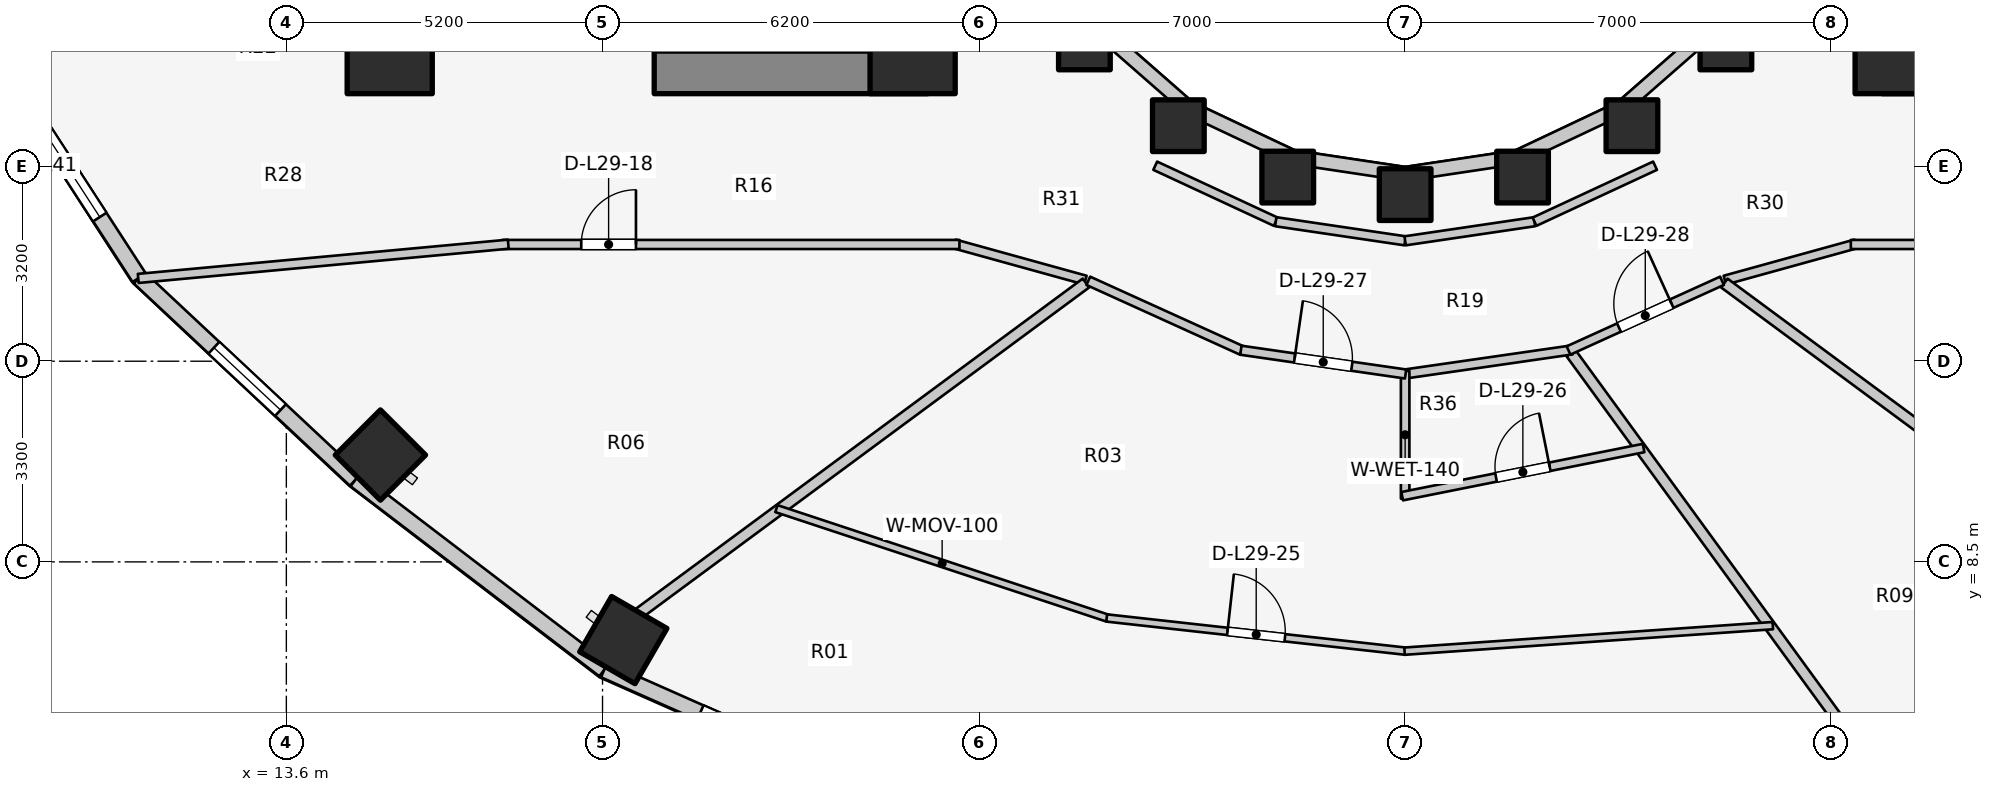
"""IFC4 building model, lengths in metres.
Left out: names, types, materials, properties, quantities, classifications, styles, units other than length and angle.
Written with IfcOpenShell. Run it as: python <this file> out.ifc"""

import sys

from ifc_helpers import new_model, si_unit, direction, frame, frame_2d, origin, origin_2d, place, context, subcontext, project, spatial, rectangle, extrude, element, fill, save


model = new_model("IFC4")
c1 = context("Model", 3, precision=1e-05, world=origin(), true_north=direction((0.0, 1.0)))
c2 = subcontext(c1, "Body", "Model", "MODEL_VIEW")
j1 = project(units=[si_unit("LENGTHUNIT", "METRE"), si_unit("PLANEANGLEUNIT", "RADIAN")], contexts=[c1])
p1 = place(None, origin())
s1 = spatial("IfcSite", under=j1, at=p1, CompositionType="ELEMENT")
p2 = place(p1, origin())
s2 = spatial("IfcBuilding", under=s1, at=p2, CompositionType="ELEMENT")
p3 = place(p2, frame((0.0, 0.0, 98.0)))
s3 = spatial("IfcBuildingStorey", under=s2, at=p3, CompositionType="ELEMENT", Elevation=98.0)
for number, where, z_axis, x_axis in (
    (1, (19.65, 16.55, 0.0), (0.0, 0.0, 1.0), (1.0, 0.0, 0.0)),
    (2, (39.85, 16.55, 0.0), (0.0, 0.0, 1.0), (1.0, 0.0, 0.0)),
):
    element("IfcWall", number, at=place(p3, frame(where, z_axis=z_axis, x_axis=x_axis)), inside=s3, PredefinedType="SHEAR", context=c2, shape_type="SweptSolid", body=[
        extrude(rectangle(XDim=4.5, YDim=0.7, at=frame_2d((2.25, 0.0))), origin(), (0.0, 0.0, 1.0), 3.1),
    ])
for number, where, z_axis, x_axis in (
    (3, (15.3, 16.9, 0.0), (0.0, 0.0, 1.0), (1.0, 0.0, 0.0)),
    (4, (23.9, 16.9, 0.0), (0.0, 0.0, 1.0), (1.0, 0.0, 0.0)),
    (5, (40.1, 16.9, 0.0), (0.0, 0.0, 1.0), (1.0, 0.0, 0.0)),
):
    element("IfcColumn", number, at=place(p3, frame(where, z_axis=z_axis, x_axis=x_axis)), inside=s3, PredefinedType="COLUMN", context=c2, shape_type="SweptSolid", body=[
        extrude(rectangle(XDim=1.4, YDim=1.4, at=origin_2d()), origin(), (0.0, 0.0, 1.0), 3.1),
    ])
p4 = place(p3, frame((26.725, 17.018, 0.0), z_axis=(0.0, 0.0, 1.0), x_axis=(1.0, 0.0, 0.0)))
e6 = element("IfcColumn", 6, at=p4, inside=s3, PredefinedType="COLUMN", context=c2, shape_type="SweptSolid", body=[
    extrude(rectangle(XDim=0.85, YDim=0.85, at=origin_2d()), origin(), (0.0, 0.0, 1.0), 3.1),
])
p5 = place(p3, frame((15.147, 10.257, 0.0), z_axis=(0.0, 0.0, 1.0), x_axis=(-0.707106781187, -0.707106781187, 0.0)))
e7 = element("IfcColumn", 7, at=p5, inside=s3, PredefinedType="COLUMN", context=c2, shape_type="SweptSolid", body=[
    extrude(rectangle(XDim=1.05, YDim=1.05, at=origin_2d()), origin(), (0.0, 0.0, 1.0), 3.1),
])
p6 = place(p3, frame((28.27, 15.673, 0.0), z_axis=(0.0, 0.0, 1.0), x_axis=(1.0, 0.0, 0.0)))
e8 = element("IfcColumn", 8, at=p6, inside=s3, PredefinedType="COLUMN", context=c2, shape_type="SweptSolid", body=[
    extrude(rectangle(XDim=0.85, YDim=0.85, at=origin_2d()), origin(), (0.0, 0.0, 1.0), 3.1),
])
p7 = place(p3, frame((19.142, 7.214, 0.0), z_axis=(0.0, 0.0, 1.0), x_axis=(-0.5, -0.866025403784, 0.0)))
e9 = element("IfcColumn", 9, at=p7, inside=s3, PredefinedType="COLUMN", context=c2, shape_type="SweptSolid", body=[
    extrude(rectangle(XDim=1.05, YDim=1.05, at=origin_2d()), origin(), (0.0, 0.0, 1.0), 3.1),
])
for number, where, z_axis, x_axis in (
    (10, (30.069, 14.828, 0.0), (0.0, 0.0, 1.0), (1.0, 0.0, 0.0)),
    (11, (32.0, 14.54, 0.0), (0.0, 0.0, 1.0), (1.0, 0.0, 0.0)),
    (12, (33.931, 14.828, 0.0), (0.0, 0.0, 1.0), (1.0, 0.0, 0.0)),
    (13, (35.73, 15.673, 0.0), (0.0, 0.0, 1.0), (1.0, 0.0, 0.0)),
    (14, (37.275, 17.018, 0.0), (0.0, 0.0, 1.0), (1.0, 0.0, 0.0)),
):
    element("IfcColumn", number, at=place(p3, frame(where, z_axis=z_axis, x_axis=x_axis)), inside=s3, PredefinedType="COLUMN", context=c2, shape_type="SweptSolid", body=[
        extrude(rectangle(XDim=0.85, YDim=0.85, at=origin_2d()), origin(), (0.0, 0.0, 1.0), 3.1),
    ])
p8 = place(p3, frame((26.965, 17.258, 0.0), z_axis=(0.0, 0.0, 1.0), x_axis=(0.752576694707, -0.658504607869, 0.0)))
e15 = element("IfcWall", 15, at=p8, inside=s3, PredefinedType="STANDARD", context=c2, shape_type="SweptSolid", body=[
    extrude(rectangle(XDim=1.959, YDim=0.23, at=frame_2d((0.98, 0.0))), origin(), (0.0, 0.0, 1.0), 2.16),
])
p9 = place(p3, frame((28.44, 15.968, 0.0), z_axis=(0.0, 0.0, 1.0), x_axis=(0.904179699603, -0.427152280606, 0.0)))
e16 = element("IfcWall", 16, at=p9, inside=s3, PredefinedType="STANDARD", context=c2, shape_type="SweptSolid", body=[
    extrude(rectangle(XDim=1.899, YDim=0.23, at=frame_2d((0.95, 0.0))), origin(), (0.0, 0.0, 1.0), 2.16),
])
for number, where, z_axis, x_axis in (
    (17, (30.157, 15.157, 0.0), (0.0, 0.0, 1.0), (0.989, -0.149, 0.0)),
    (18, (32.0, 14.88, 0.0), (0.0, 0.0, 1.0), (0.989, 0.149, 0.0)),
):
    element("IfcWall", number, at=place(p3, frame(where, z_axis=z_axis, x_axis=x_axis)), inside=s3, PredefinedType="STANDARD", context=c2, shape_type="SweptSolid", body=[
        extrude(rectangle(XDim=1.864, YDim=0.23, at=frame_2d((0.932, 0.0))), origin(), (0.0, 0.0, 1.0), 2.16),
    ])
p10 = place(p3, frame((33.843, 15.157, 0.0), z_axis=(0.0, 0.0, 1.0), x_axis=(0.904179699603, 0.427152280606, 0.0)))
e19 = element("IfcWall", 19, at=p10, inside=s3, PredefinedType="STANDARD", context=c2, shape_type="SweptSolid", body=[
    extrude(rectangle(XDim=1.899, YDim=0.23, at=frame_2d((0.95, 0.0))), origin(), (0.0, 0.0, 1.0), 2.16),
])
p11 = place(p3, frame((35.56, 15.968, 0.0), z_axis=(0.0, 0.0, 1.0), x_axis=(0.752576694707, 0.658504607869, 0.0)))
e20 = element("IfcWall", 20, at=p11, inside=s3, PredefinedType="STANDARD", context=c2, shape_type="SweptSolid", body=[
    extrude(rectangle(XDim=1.959, YDim=0.23, at=frame_2d((0.98, 0.0))), origin(), (0.0, 0.0, 1.0), 2.16),
])
p12 = place(p3, frame((8.578, 17.181, 0.0), z_axis=(0.0, 0.0, 1.0), x_axis=(0.544388392991, -0.838833283541, 0.0)))
e21 = element("IfcWall", 21, at=p12, inside=s3, PredefinedType="STANDARD", context=c2, shape_type="SweptSolid", body=[
    extrude(rectangle(XDim=4.778, YDim=0.26, at=frame_2d((2.389, 0.0))), origin(), (0.0, 0.0, 1.0), 2.85),
])
p13 = place(p12, frame((1.189, 0.0, 0.75)))
e22 = element("IfcOpeningElement", 22, at=p13, cuts=e21, PredefinedType="OPENING", context=c2, shape_type="SweptSolid", body=[
    extrude(rectangle(XDim=2.4, YDim=1.7, at=frame_2d((1.2, 0.85))), frame((0.0, 0.14, 0.0), z_axis=(0.0, -1.0, 0.0), x_axis=(1.0, 0.0, 0.0)), (0.0, 0.0, 1.0), 0.28),
])
p14 = place(p3, frame((11.179, 13.173, 0.0), z_axis=(0.0, 0.0, 1.0), x_axis=(0.730162452258, -0.68327358599, 0.0)))
e23 = element("IfcWall", 23, at=p14, inside=s3, PredefinedType="STANDARD", context=c2, shape_type="SweptSolid", body=[
    extrude(rectangle(XDim=4.868, YDim=0.26, at=frame_2d((2.434, 0.0))), origin(), (0.0, 0.0, 1.0), 2.85),
])
p15 = place(p14, frame((1.684, 0.0, 0.75)))
e24 = element("IfcOpeningElement", 24, at=p15, cuts=e23, PredefinedType="OPENING", context=c2, shape_type="SweptSolid", body=[
    extrude(rectangle(XDim=1.5, YDim=1.6, at=frame_2d((0.75, 0.8))), frame((0.0, 0.14, 0.0), z_axis=(0.0, -1.0, 0.0), x_axis=(1.0, 0.0, 0.0)), (0.0, 0.0, 1.0), 0.28),
])
p16 = place(p3, frame((14.734, 9.847, 0.0), z_axis=(0.0, 0.0, 1.0), x_axis=(0.794809810864, -0.606858603427, 0.0)))
e25 = element("IfcWall", 25, at=p16, inside=s3, PredefinedType="STANDARD", context=c2, shape_type="SweptSolid", body=[
    extrude(rectangle(XDim=5.149, YDim=0.26, at=frame_2d((2.575, 0.0))), origin(), (0.0, 0.0, 1.0), 2.85),
])
p17 = place(p3, frame((18.827, 6.722, 0.0), z_axis=(0.0, 0.0, 1.0), x_axis=(0.914336605747, -0.404955023911, 0.0)))
e26 = element("IfcWall", 26, at=p17, inside=s3, PredefinedType="STANDARD", context=c2, shape_type="SweptSolid", body=[
    extrude(rectangle(XDim=5.859, YDim=0.26, at=frame_2d((2.929, 0.0))), origin(), (0.0, 0.0, 1.0), 2.85),
])
p18 = place(p17, frame((1.729, 0.0, 0.75)))
e27 = element("IfcOpeningElement", 27, at=p18, cuts=e26, PredefinedType="OPENING", context=c2, shape_type="SweptSolid", body=[
    extrude(rectangle(XDim=2.4, YDim=1.7, at=frame_2d((1.2, 0.85))), frame((0.0, 0.14, 0.0), z_axis=(0.0, -1.0, 0.0), x_axis=(1.0, 0.0, 0.0)), (0.0, 0.0, 1.0), 0.28),
])
p19 = place(p3, frame((39.816, 4.349, 0.0), z_axis=(0.0, 0.0, 1.0), x_axis=(0.914336605747, 0.404955023911, 0.0)))
e28 = element("IfcWall", 28, at=p19, inside=s3, PredefinedType="STANDARD", context=c2, shape_type="SweptSolid", body=[
    extrude(rectangle(XDim=5.859, YDim=0.26, at=frame_2d((2.929, 0.0))), origin(), (0.0, 0.0, 1.0), 2.85),
])
p20 = place(p19, frame((1.729, 0.0, 0.75)))
e29 = element("IfcOpeningElement", 29, at=p20, cuts=e28, PredefinedType="OPENING", context=c2, shape_type="SweptSolid", body=[
    extrude(rectangle(XDim=2.4, YDim=1.7, at=frame_2d((1.2, 0.85))), frame((0.0, 0.14, 0.0), z_axis=(0.0, -1.0, 0.0), x_axis=(1.0, 0.0, 0.0)), (0.0, 0.0, 1.0), 0.28),
])
p21 = place(p3, frame((27.89, 15.015, 0.0), z_axis=(0.0, 0.0, 1.0), x_axis=(0.906943449489, -0.421252393975, 0.0)))
e30 = element("IfcWall", 30, at=p21, inside=s3, PredefinedType="PARTITIONING", context=c2, shape_type="SweptSolid", body=[
    extrude(rectangle(XDim=2.186, YDim=0.15, at=frame_2d((1.093, 0.0))), origin(), (0.0, 0.0, 1.0), 2.272),
])
for number, where, z_axis, x_axis in (
    (31, (29.873, 14.094, 0.0), (0.0, 0.0, 1.0), (0.989, -0.146, 0.0)),
    (32, (32.0, 13.78, 0.0), (0.0, 0.0, 1.0), (0.989, 0.146, 0.0)),
):
    element("IfcWall", number, at=place(p3, frame(where, z_axis=z_axis, x_axis=x_axis)), inside=s3, PredefinedType="PARTITIONING", context=c2, shape_type="SweptSolid", body=[
        extrude(rectangle(XDim=2.151, YDim=0.15, at=frame_2d((1.075, 0.0))), origin(), (0.0, 0.0, 1.0), 2.272),
    ])
p22 = place(p3, frame((34.127, 14.094, 0.0), z_axis=(0.0, 0.0, 1.0), x_axis=(0.906943449489, 0.421252393975, 0.0)))
e33 = element("IfcWall", 33, at=p22, inside=s3, PredefinedType="PARTITIONING", context=c2, shape_type="SweptSolid", body=[
    extrude(rectangle(XDim=2.186, YDim=0.15, at=frame_2d((1.093, 0.0))), origin(), (0.0, 0.0, 1.0), 2.272),
])
p23 = place(p3, frame((26.742, 13.133, 0.0), z_axis=(0.0, 0.0, 1.0), x_axis=(-0.963833843713, 0.266503886865, 0.0)))
e34 = element("IfcWall", 34, at=p23, inside=s3, PredefinedType="PARTITIONING", context=c2, shape_type="SweptSolid", body=[
    extrude(rectangle(XDim=2.232, YDim=0.15, at=frame_2d((1.116, 0.0))), origin(), (0.0, 0.0, 1.0), 2.272),
])
p24 = place(p3, frame((17.15, 13.72, 0.0), z_axis=(0.0, 0.0, 1.0), x_axis=(1.0, 0.0, 0.0)))
e35 = element("IfcWall", 35, at=p24, inside=s3, PredefinedType="PARTITIONING", context=c2, shape_type="SweptSolid", body=[
    extrude(rectangle(XDim=7.52, YDim=0.15, at=frame_2d((3.76, 0.0))), origin(), (0.0, 0.0, 1.0), 2.272),
])
p25 = place(p24, frame((1.3, 0.0, 0.0)))
e36 = element("IfcOpeningElement", 36, at=p25, cuts=e35, PredefinedType="OPENING", context=c2, shape_type="SweptSolid", body=[
    extrude(rectangle(XDim=0.9, YDim=2.1, at=frame_2d((0.45, 1.05))), frame((0.0, 0.085, 0.0), z_axis=(0.0, -1.0, 0.0), x_axis=(1.0, 0.0, 0.0)), (0.0, 0.0, 1.0), 0.17),
])
p26 = place(p3, frame((17.25, 13.725, 0.0), z_axis=(0.0, 0.0, 1.0), x_axis=(-0.995748209098, -0.092116795851, 0.0)))
e37 = element("IfcWall", 37, at=p26, inside=s3, PredefinedType="PARTITIONING", context=c2, shape_type="SweptSolid", body=[
    extrude(rectangle(XDim=6.112, YDim=0.15, at=frame_2d((3.056, 0.0))), origin(), (0.0, 0.0, 1.0), 2.142),
])
p27 = place(p3, frame((37.258, 13.133, 0.0), z_axis=(0.0, 0.0, 1.0), x_axis=(0.963833843713, 0.266503886865, 0.0)))
e38 = element("IfcWall", 38, at=p27, inside=s3, PredefinedType="PARTITIONING", context=c2, shape_type="SweptSolid", body=[
    extrude(rectangle(XDim=2.232, YDim=0.15, at=frame_2d((1.116, 0.0))), origin(), (0.0, 0.0, 1.0), 2.272),
])
p28 = place(p3, frame((39.33, 13.72, 0.0), z_axis=(0.0, 0.0, 1.0), x_axis=(1.0, 0.0, 0.0)))
e39 = element("IfcWall", 39, at=p28, inside=s3, PredefinedType="PARTITIONING", context=c2, shape_type="SweptSolid", body=[
    extrude(rectangle(XDim=7.52, YDim=0.15, at=frame_2d((3.76, 0.0))), origin(), (0.0, 0.0, 1.0), 2.272),
])
p29 = place(p28, frame((5.22, 0.0, 0.0)))
e40 = element("IfcOpeningElement", 40, at=p29, cuts=e39, PredefinedType="OPENING", context=c2, shape_type="SweptSolid", body=[
    extrude(rectangle(XDim=0.9, YDim=2.1, at=frame_2d((0.45, 1.05))), frame((0.0, 0.085, 0.0), z_axis=(0.0, -1.0, 0.0), x_axis=(1.0, 0.0, 0.0)), (0.0, 0.0, 1.0), 0.17),
])
p30 = place(p3, frame((26.751, 13.086, 0.0), z_axis=(0.0, 0.0, 1.0), x_axis=(-0.80430981394, -0.594210167533, 0.0)))
e41 = element("IfcWall", 41, at=p30, inside=s3, PredefinedType="PARTITIONING", context=c2, shape_type="SweptSolid", body=[
    extrude(rectangle(XDim=9.146, YDim=0.18, at=frame_2d((4.573, 0.0))), origin(), (0.0, 0.0, 1.0), 2.272),
])
p31 = place(p3, frame((34.727, 11.934, 0.0), z_axis=(0.0, 0.0, 1.0), x_axis=(0.589042211476, -0.808102266486, 0.0)))
e42 = element("IfcWall", 42, at=p31, inside=s3, PredefinedType="PARTITIONING", context=c2, shape_type="SweptSolid", body=[
    extrude(rectangle(XDim=8.101, YDim=0.18, at=frame_2d((4.051, 0.0))), origin(), (0.0, 0.0, 1.0), 2.272),
])
p32 = place(p3, frame((37.249, 13.086, 0.0), z_axis=(0.0, 0.0, 1.0), x_axis=(0.80430981394, -0.594210167533, 0.0)))
e43 = element("IfcWall", 43, at=p32, inside=s3, PredefinedType="PARTITIONING", context=c2, shape_type="SweptSolid", body=[
    extrude(rectangle(XDim=9.146, YDim=0.18, at=frame_2d((4.573, 0.0))), origin(), (0.0, 0.0, 1.0), 2.272),
])
p33 = place(p3, frame((21.66, 9.376, 0.0), z_axis=(0.0, 0.0, 1.0), x_axis=(0.949429126756, -0.313981421852, 0.0)))
e44 = element("IfcWall", 44, at=p33, inside=s3, PredefinedType="MOVABLE", context=c2, shape_type="SweptSolid", body=[
    extrude(rectangle(XDim=5.741, YDim=0.12, at=frame_2d((2.87, 0.0))), origin(), (0.0, 0.0, 1.0), 2.272),
])
p34 = place(p3, frame((27.091, 7.578, 0.0), z_axis=(0.0, 0.0, 1.0), x_axis=(0.993892154322, -0.110355722898, 0.0)))
e45 = element("IfcWall", 45, at=p34, inside=s3, PredefinedType="MOVABLE", context=c2, shape_type="SweptSolid", body=[
    extrude(rectangle(XDim=4.949, YDim=0.12, at=frame_2d((2.475, 0.0))), origin(), (0.0, 0.0, 1.0), 2.272),
])
p35 = place(p34, frame((2.0, 0.0, 0.0)))
e46 = element("IfcOpeningElement", 46, at=p35, cuts=e45, PredefinedType="OPENING", context=c2, shape_type="SweptSolid", body=[
    extrude(rectangle(XDim=0.95, YDim=2.1, at=frame_2d((0.475, 1.05))), frame((0.0, 0.07, 0.0), z_axis=(0.0, -1.0, 0.0), x_axis=(1.0, 0.0, 0.0)), (0.0, 0.0, 1.0), 0.14),
])
p36 = place(p3, frame((31.99, 7.032, 0.0), z_axis=(0.0, 0.0, 1.0), x_axis=(0.997605327057, 0.06916365684, 0.0)))
e47 = element("IfcWall", 47, at=p36, inside=s3, PredefinedType="MOVABLE", context=c2, shape_type="SweptSolid", body=[
    extrude(rectangle(XDim=6.072, YDim=0.12, at=frame_2d((3.036, 0.0))), origin(), (0.0, 0.0, 1.0), 2.272),
])
p37 = place(p3, frame((31.95, 11.583, 0.0), z_axis=(0.0, 0.0, 1.0), x_axis=(0.989761784218, 0.142729150844, 0.0)))
e48 = element("IfcWall", 48, at=p37, inside=s3, PredefinedType="PARTITIONING", context=c2, shape_type="SweptSolid", body=[
    extrude(rectangle(XDim=2.822, YDim=0.15, at=frame_2d((1.411, 0.0))), origin(), (0.0, 0.0, 1.0), 2.272),
])
p38 = place(p3, frame((32.0, 11.64, 0.0), z_axis=(0.0, 0.0, 1.0), x_axis=(0.0, -1.0, 0.0)))
e49 = element("IfcWall", 49, at=p38, inside=s3, PredefinedType="PLUMBINGWALL", context=c2, shape_type="SweptSolid", body=[
    extrude(rectangle(XDim=2.1, YDim=0.14, at=frame_2d((1.05, 0.0))), origin(), (0.0, 0.0, 1.0), 2.272),
])
p39 = place(p3, frame((31.951, 9.58, 0.0), z_axis=(0.0, 0.0, 1.0), x_axis=(0.980668708329, 0.195675457082, 0.0)))
e50 = element("IfcWall", 50, at=p39, inside=s3, PredefinedType="PLUMBINGWALL", context=c2, shape_type="SweptSolid", body=[
    extrude(rectangle(XDim=4.049, YDim=0.14, at=frame_2d((2.024, 0.0))), origin(), (0.0, 0.0, 1.0), 2.272),
])
p40 = place(p39, frame((1.574, 0.0, 0.0)))
e51 = element("IfcOpeningElement", 51, at=p40, cuts=e50, PredefinedType="OPENING", context=c2, shape_type="SweptSolid", body=[
    extrude(rectangle(XDim=0.9, YDim=2.1, at=frame_2d((0.45, 1.05))), frame((0.0, 0.08, 0.0), z_axis=(0.0, -1.0, 0.0), x_axis=(1.0, 0.0, 0.0)), (0.0, 0.0, 1.0), 0.16),
])
p41 = place(p3, frame((26.789, 13.123, 0.0), z_axis=(0.0, 0.0, 1.0), x_axis=(0.910568469686, -0.41335827319, 0.0)))
e52 = element("IfcWall", 52, at=p41, inside=s3, PredefinedType="PARTITIONING", context=c2, shape_type="SweptSolid", body=[
    extrude(rectangle(XDim=2.772, YDim=0.15, at=frame_2d((1.386, 0.0))), origin(), (0.0, 0.0, 1.0), 2.272),
])
p42 = place(p3, frame((29.299, 11.981, 0.0), z_axis=(0.0, 0.0, 1.0), x_axis=(0.989748682384, -0.142819976611, 0.0)))
e53 = element("IfcWall", 53, at=p42, inside=s3, PredefinedType="PARTITIONING", context=c2, shape_type="SweptSolid", body=[
    extrude(rectangle(XDim=2.737, YDim=0.15, at=frame_2d((1.368, 0.0))), origin(), (0.0, 0.0, 1.0), 2.272),
])
p43 = place(p42, frame((0.893, 0.0, 0.0)))
e54 = element("IfcOpeningElement", 54, at=p43, cuts=e53, PredefinedType="OPENING", context=c2, shape_type="SweptSolid", body=[
    extrude(rectangle(XDim=0.95, YDim=2.1, at=frame_2d((0.475, 1.05))), frame((0.0, 0.085, 0.0), z_axis=(0.0, -1.0, 0.0), x_axis=(1.0, 0.0, 0.0)), (0.0, 0.0, 1.0), 0.17),
])
p44 = place(p3, frame((34.687, 11.977, 0.0), z_axis=(0.0, 0.0, 1.0), x_axis=(0.910568469686, 0.41335827319, 0.0)))
e55 = element("IfcWall", 55, at=p44, inside=s3, PredefinedType="PARTITIONING", context=c2, shape_type="SweptSolid", body=[
    extrude(rectangle(XDim=2.772, YDim=0.15, at=frame_2d((1.386, 0.0))), origin(), (0.0, 0.0, 1.0), 2.272),
])
p45 = place(p44, frame((0.911, 0.0, 0.0)))
e56 = element("IfcOpeningElement", 56, at=p45, cuts=e55, PredefinedType="OPENING", context=c2, shape_type="SweptSolid", body=[
    extrude(rectangle(XDim=0.95, YDim=2.1, at=frame_2d((0.475, 1.05))), frame((0.0, 0.085, 0.0), z_axis=(0.0, -1.0, 0.0), x_axis=(1.0, 0.0, 0.0)), (0.0, 0.0, 1.0), 0.17),
])
p46 = place(p13, origin())
e57 = element("IfcWindow", 57, at=p46, inside=s3, PartitioningType="SINGLE_PANEL", PredefinedType="WINDOW", context=c2, shape_type="SweptSolid", body=[
    extrude(rectangle(XDim=2.4, YDim=1.7, at=frame_2d((1.2, 0.85))), frame((0.0, 0.03, 0.0), z_axis=(0.0, -1.0, 0.0), x_axis=(1.0, 0.0, 0.0)), (0.0, 0.0, 1.0), 0.06),
])
fill(e22, e57)
p47 = place(p15, origin())
e58 = element("IfcWindow", 58, at=p47, inside=s3, PartitioningType="SINGLE_PANEL", PredefinedType="WINDOW", context=c2, shape_type="SweptSolid", body=[
    extrude(rectangle(XDim=1.5, YDim=1.6, at=frame_2d((0.75, 0.8))), frame((0.0, 0.03, 0.0), z_axis=(0.0, -1.0, 0.0), x_axis=(1.0, 0.0, 0.0)), (0.0, 0.0, 1.0), 0.06),
])
fill(e24, e58)
p48 = place(p18, origin())
e59 = element("IfcWindow", 59, at=p48, inside=s3, PartitioningType="SINGLE_PANEL", PredefinedType="WINDOW", context=c2, shape_type="SweptSolid", body=[
    extrude(rectangle(XDim=2.4, YDim=1.7, at=frame_2d((1.2, 0.85))), frame((0.0, 0.03, 0.0), z_axis=(0.0, -1.0, 0.0), x_axis=(1.0, 0.0, 0.0)), (0.0, 0.0, 1.0), 0.06),
])
fill(e27, e59)
p49 = place(p25, origin())
e60 = element("IfcDoor", 60, at=p49, inside=s3, OperationType="SINGLE_SWING_RIGHT", PredefinedType="DOOR", context=c2, shape_type="SweptSolid", body=[
    extrude(rectangle(XDim=0.9, YDim=2.1, at=frame_2d((0.45, 1.05))), frame((0.0, 0.025, 0.0), z_axis=(0.0, -1.0, 0.0), x_axis=(1.0, 0.0, 0.0)), (0.0, 0.0, 1.0), 0.05),
])
fill(e36, e60)
p50 = place(p35, origin())
e61 = element("IfcDoor", 61, at=p50, inside=s3, OperationType="SINGLE_SWING_LEFT", PredefinedType="DOOR", context=c2, shape_type="SweptSolid", body=[
    extrude(rectangle(XDim=0.95, YDim=2.1, at=frame_2d((0.475, 1.05))), frame((0.0, 0.025, 0.0), z_axis=(0.0, -1.0, 0.0), x_axis=(1.0, 0.0, 0.0)), (0.0, 0.0, 1.0), 0.05),
])
fill(e46, e61)
p51 = place(p40, origin())
e62 = element("IfcDoor", 62, at=p51, inside=s3, OperationType="SINGLE_SWING_RIGHT", PredefinedType="DOOR", context=c2, shape_type="SweptSolid", body=[
    extrude(rectangle(XDim=0.9, YDim=2.1, at=frame_2d((0.45, 1.05))), frame((0.0, 0.025, 0.0), z_axis=(0.0, -1.0, 0.0), x_axis=(1.0, 0.0, 0.0)), (0.0, 0.0, 1.0), 0.05),
])
fill(e51, e62)
p52 = place(p43, origin())
e63 = element("IfcDoor", 63, at=p52, inside=s3, OperationType="SINGLE_SWING_LEFT", PredefinedType="DOOR", context=c2, shape_type="SweptSolid", body=[
    extrude(rectangle(XDim=0.95, YDim=2.1, at=frame_2d((0.475, 1.05))), frame((0.0, 0.025, 0.0), z_axis=(0.0, -1.0, 0.0), x_axis=(1.0, 0.0, 0.0)), (0.0, 0.0, 1.0), 0.05),
])
fill(e54, e63)
p53 = place(p45, origin())
e64 = element("IfcDoor", 64, at=p53, inside=s3, OperationType="SINGLE_SWING_RIGHT", PredefinedType="DOOR", context=c2, shape_type="SweptSolid", body=[
    extrude(rectangle(XDim=0.95, YDim=2.1, at=frame_2d((0.475, 1.05))), frame((0.0, 0.025, 0.0), z_axis=(0.0, -1.0, 0.0), x_axis=(1.0, 0.0, 0.0)), (0.0, 0.0, 1.0), 0.05),
])
fill(e56, e64)
save(model, sys.argv[1])
